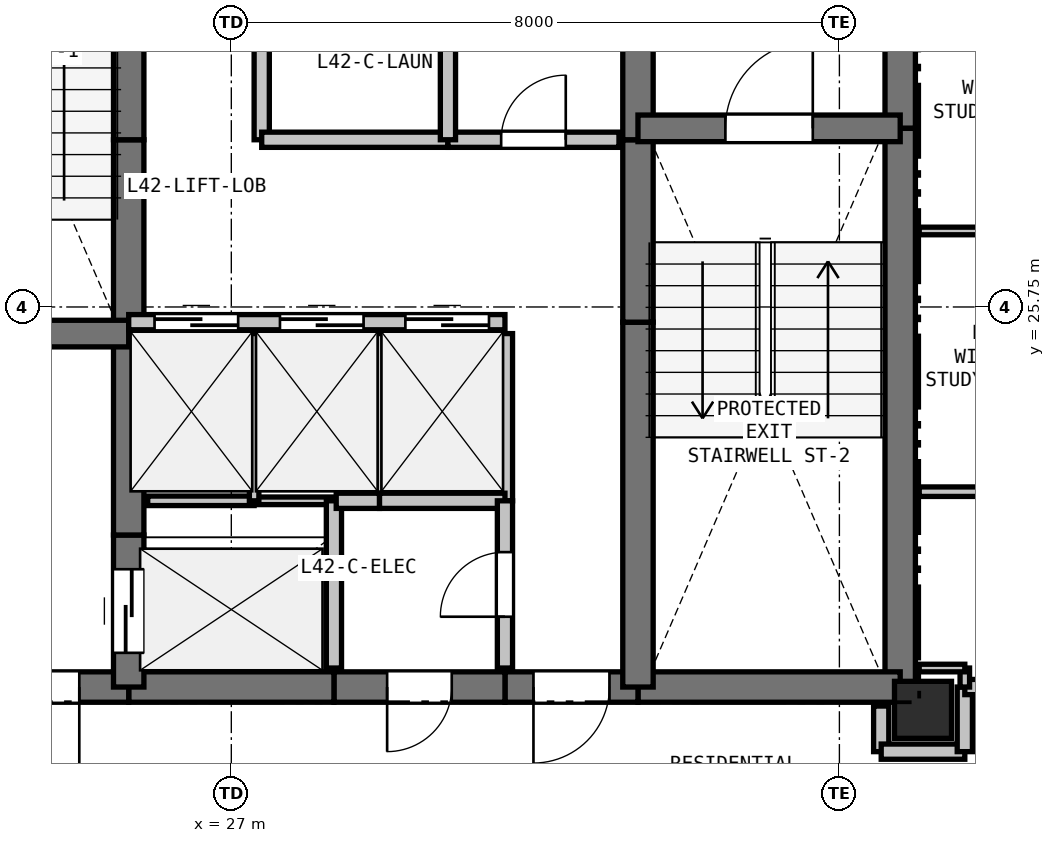
"""IFC4 building model, lengths in metres.
Left out: names, types, materials, properties, quantities, classifications, styles, units other than length and angle.
Written with IfcOpenShell. Run it as: python <this file> out.ifc"""

import sys

from ifc_helpers import new_model, si_unit, direction, frame, frame_2d, origin, origin_2d, place, context, subcontext, project, spatial, rectangle, extrude, element, fill, save


model = new_model("IFC4")
c1 = context("Model", 3, precision=1e-05, world=origin(), true_north=direction((0.0, 1.0)))
c2 = subcontext(c1, "Body", "Model", "MODEL_VIEW")
j1 = project(units=[si_unit("LENGTHUNIT", "METRE"), si_unit("PLANEANGLEUNIT", "RADIAN")], contexts=[c1])
p1 = place(None, origin())
s1 = spatial("IfcSite", under=j1, at=p1, CompositionType="ELEMENT")
p2 = place(p1, origin())
s2 = spatial("IfcBuilding", under=s1, at=p2, CompositionType="ELEMENT")
p3 = place(p2, frame((0.0, 0.0, 150.9)))
s3 = spatial("IfcBuildingStorey", under=s2, at=p3, CompositionType="ELEMENT", Elevation=150.9)
p4 = place(p3, frame((36.1, 20.45, 0.0), z_axis=(0.0, 0.0, 1.0), x_axis=(1.0, 0.0, 0.0)))
e1 = element("IfcColumn", 1, at=p4, inside=s3, PredefinedType="COLUMN", context=c2, shape_type="SweptSolid", body=[
    extrude(rectangle(XDim=0.75, YDim=0.75, at=origin_2d()), origin(), (0.0, 0.0, 1.0), 3.3),
])
p5 = place(p3, frame((35.8, 32.75, 0.0), z_axis=(0.0, 0.0, 1.0), x_axis=(0.0, -1.0, 0.0)))
e2 = element("IfcWall", 2, at=p5, inside=s3, PredefinedType="SHEAR", context=c2, shape_type="SweptSolid", body=[
    extrude(rectangle(XDim=4.65, YDim=0.4, at=frame_2d((2.325, 0.0))), origin(), (0.0, 0.0, 1.0), 3.06),
])
p6 = place(p3, frame((35.8, 28.1, 0.0), z_axis=(0.0, 0.0, 1.0), x_axis=(0.0, -1.0, 0.0)))
e3 = element("IfcWall", 3, at=p6, inside=s3, PredefinedType="SHEAR", context=c2, shape_type="SweptSolid", body=[
    extrude(rectangle(XDim=7.35, YDim=0.4, at=frame_2d((3.675, 0.0))), origin(), (0.0, 0.0, 1.0), 3.06),
])
p7 = place(p3, frame((35.8, 20.75, 0.0), z_axis=(0.0, 0.0, 1.0), x_axis=(-1.0, 0.0, 0.0)))
e4 = element("IfcWall", 4, at=p7, inside=s3, PredefinedType="SHEAR", context=c2, shape_type="SweptSolid", body=[
    extrude(rectangle(XDim=3.45, YDim=0.4, at=frame_2d((1.725, 0.0))), origin(), (0.0, 0.0, 1.0), 3.06),
])
p8 = place(p3, frame((32.35, 20.75, 0.0), z_axis=(0.0, 0.0, 1.0), x_axis=(-1.0, 0.0, 0.0)))
e5 = element("IfcWall", 5, at=p8, inside=s3, PredefinedType="SHEAR", context=c2, shape_type="SweptSolid", body=[
    extrude(rectangle(XDim=1.75, YDim=0.4, at=frame_2d((0.875, 0.0))), origin(), (0.0, 0.0, 1.0), 3.06),
])
p9 = place(p8, frame((0.375, 0.0, 0.0)))
e6 = element("IfcOpeningElement", 6, at=p9, cuts=e5, PredefinedType="OPENING", context=c2, shape_type="SweptSolid", body=[
    extrude(rectangle(XDim=1.0, YDim=2.15, at=frame_2d((0.5, 1.075))), frame((0.0, 0.21, 0.0), z_axis=(0.0, -1.0, 0.0), x_axis=(1.0, 0.0, 0.0)), (0.0, 0.0, 1.0), 0.42),
])
p10 = place(p3, frame((30.6, 20.75, 0.0), z_axis=(0.0, 0.0, 1.0), x_axis=(-1.0, 0.0, 0.0)))
e7 = element("IfcWall", 7, at=p10, inside=s3, PredefinedType="SHEAR", context=c2, shape_type="SweptSolid", body=[
    extrude(rectangle(XDim=2.25, YDim=0.4, at=frame_2d((1.125, 0.0))), origin(), (0.0, 0.0, 1.0), 3.06),
])
p11 = place(p10, frame((0.7, 0.0, 0.0)))
e8 = element("IfcOpeningElement", 8, at=p11, cuts=e7, PredefinedType="OPENING", context=c2, shape_type="SweptSolid", body=[
    extrude(rectangle(XDim=0.85, YDim=2.1, at=frame_2d((0.425, 1.05))), frame((0.0, 0.21, 0.0), z_axis=(0.0, -1.0, 0.0), x_axis=(1.0, 0.0, 0.0)), (0.0, 0.0, 1.0), 0.42),
])
p12 = place(p3, frame((28.35, 20.75, 0.0), z_axis=(0.0, 0.0, 1.0), x_axis=(-1.0, 0.0, 0.0)))
e9 = element("IfcWall", 9, at=p12, inside=s3, PredefinedType="SHEAR", context=c2, shape_type="SweptSolid", body=[
    extrude(rectangle(XDim=2.7, YDim=0.4, at=frame_2d((1.35, 0.0))), origin(), (0.0, 0.0, 1.0), 3.06),
])
p13 = place(p3, frame((25.65, 20.75, 0.0), z_axis=(0.0, 0.0, 1.0), x_axis=(-1.0, 0.0, 0.0)))
e10 = element("IfcWall", 10, at=p13, inside=s3, PredefinedType="SHEAR", context=c2, shape_type="SweptSolid", body=[
    extrude(rectangle(XDim=3.45, YDim=0.4, at=frame_2d((1.725, 0.0))), origin(), (0.0, 0.0, 1.0), 3.06),
])
p14 = place(p13, frame((0.65, 0.0, 0.0)))
e11 = element("IfcOpeningElement", 11, at=p14, cuts=e10, PredefinedType="OPENING", context=c2, shape_type="SweptSolid", body=[
    extrude(rectangle(XDim=1.15, YDim=2.15, at=frame_2d((0.575, 1.075))), frame((0.0, 0.21, 0.0), z_axis=(0.0, -1.0, 0.0), x_axis=(1.0, 0.0, 0.0)), (0.0, 0.0, 1.0), 0.42),
])
p15 = place(p3, frame((25.65, 20.75, 0.0), z_axis=(0.0, 0.0, 1.0), x_axis=(0.0, 1.0, 0.0)))
e12 = element("IfcWall", 12, at=p15, inside=s3, PredefinedType="SHEAR", context=c2, shape_type="SweptSolid", body=[
    extrude(rectangle(XDim=2.0, YDim=0.4, at=frame_2d((1.0, 0.0))), origin(), (0.0, 0.0, 1.0), 3.06),
])
p16 = place(p15, frame((0.45, 0.0, 0.0)))
e13 = element("IfcOpeningElement", 13, at=p16, cuts=e12, PredefinedType="OPENING", context=c2, shape_type="SweptSolid", body=[
    extrude(rectangle(XDim=1.1, YDim=2.15, at=frame_2d((0.55, 1.075))), frame((0.0, 0.21, 0.0), z_axis=(0.0, -1.0, 0.0), x_axis=(1.0, 0.0, 0.0)), (0.0, 0.0, 1.0), 0.42),
])
p17 = place(p3, frame((25.65, 22.75, 0.0), z_axis=(0.0, 0.0, 1.0), x_axis=(0.0, 1.0, 0.0)))
e14 = element("IfcWall", 14, at=p17, inside=s3, PredefinedType="SHEAR", context=c2, shape_type="SweptSolid", body=[
    extrude(rectangle(XDim=2.8, YDim=0.4, at=frame_2d((1.4, 0.0))), origin(), (0.0, 0.0, 1.0), 3.06),
])
p18 = place(p3, frame((25.65, 25.55, 0.0), z_axis=(0.0, 0.0, 1.0), x_axis=(0.0, 1.0, 0.0)))
e15 = element("IfcWall", 15, at=p18, inside=s3, PredefinedType="SHEAR", context=c2, shape_type="SweptSolid", body=[
    extrude(rectangle(XDim=2.4, YDim=0.4, at=frame_2d((1.2, 0.0))), origin(), (0.0, 0.0, 1.0), 3.06),
])
for number, where, z_axis, x_axis in (
    (16, (25.65, 27.95, 0.0), (0.0, 0.0, 1.0), (0.0, 1.0, 0.0)),
    (17, (32.35, 20.75, 0.0), (0.0, 0.0, 1.0), (0.0, 1.0, 0.0)),
):
    element("IfcWall", number, at=place(p3, frame(where, z_axis=z_axis, x_axis=x_axis)), inside=s3, PredefinedType="SHEAR", context=c2, shape_type="SweptSolid", body=[
        extrude(rectangle(XDim=4.8, YDim=0.4, at=frame_2d((2.4, 0.0))), origin(), (0.0, 0.0, 1.0), 3.06),
    ])
p19 = place(p3, frame((32.35, 25.55, 0.0), z_axis=(0.0, 0.0, 1.0), x_axis=(0.0, 1.0, 0.0)))
e18 = element("IfcWall", 18, at=p19, inside=s3, PredefinedType="SHEAR", context=c2, shape_type="SweptSolid", body=[
    extrude(rectangle(XDim=2.4, YDim=0.4, at=frame_2d((1.2, 0.0))), origin(), (0.0, 0.0, 1.0), 3.06),
])
p20 = place(p3, frame((32.35, 27.95, 0.0), z_axis=(0.0, 0.0, 1.0), x_axis=(0.0, 1.0, 0.0)))
e19 = element("IfcWall", 19, at=p20, inside=s3, PredefinedType="SHEAR", context=c2, shape_type="SweptSolid", body=[
    extrude(rectangle(XDim=2.8, YDim=0.4, at=frame_2d((1.4, 0.0))), origin(), (0.0, 0.0, 1.0), 3.06),
])
p21 = place(p3, frame((22.2, 25.4, 0.0), z_axis=(0.0, 0.0, 1.0), x_axis=(1.0, 0.0, 0.0)))
e20 = element("IfcWall", 20, at=p21, inside=s3, PredefinedType="SHEAR", context=c2, shape_type="SweptSolid", body=[
    extrude(rectangle(XDim=3.45, YDim=0.35, at=frame_2d((1.725, 0.0))), origin(), (0.0, 0.0, 1.0), 3.06),
])
p22 = place(p21, frame((1.15, 0.0, 0.0)))
e21 = element("IfcOpeningElement", 21, at=p22, cuts=e20, PredefinedType="OPENING", context=c2, shape_type="SweptSolid", body=[
    extrude(rectangle(XDim=1.15, YDim=2.15, at=frame_2d((0.575, 1.075))), frame((0.0, 0.185, 0.0), z_axis=(0.0, -1.0, 0.0), x_axis=(1.0, 0.0, 0.0)), (0.0, 0.0, 1.0), 0.37),
])
p23 = place(p3, frame((32.35, 28.1, 0.0), z_axis=(0.0, 0.0, 1.0), x_axis=(1.0, 0.0, 0.0)))
e22 = element("IfcWall", 22, at=p23, inside=s3, PredefinedType="SHEAR", context=c2, shape_type="SweptSolid", body=[
    extrude(rectangle(XDim=3.45, YDim=0.35, at=frame_2d((1.725, 0.0))), origin(), (0.0, 0.0, 1.0), 3.06),
])
p24 = place(p23, frame((1.15, 0.0, 0.0)))
e23 = element("IfcOpeningElement", 23, at=p24, cuts=e22, PredefinedType="OPENING", context=c2, shape_type="SweptSolid", body=[
    extrude(rectangle(XDim=1.15, YDim=2.15, at=frame_2d((0.575, 1.075))), frame((0.0, 0.185, 0.0), z_axis=(0.0, -1.0, 0.0), x_axis=(1.0, 0.0, 0.0)), (0.0, 0.0, 1.0), 0.37),
])
p25 = place(p3, frame((25.65, 25.55, 0.0), z_axis=(0.0, 0.0, 1.0), x_axis=(1.0, 0.0, 0.0)))
e24 = element("IfcWall", 24, at=p25, inside=s3, PredefinedType="PARTITIONING", context=c2, shape_type="SweptSolid", body=[
    extrude(rectangle(XDim=4.95, YDim=0.2, at=frame_2d((2.475, 0.0))), origin(), (0.0, 0.0, 1.0), 3.06),
])
p26 = place(p25, frame((0.34, 0.0, 0.0)))
e25 = element("IfcOpeningElement", 25, at=p26, cuts=e24, PredefinedType="OPENING", context=c2, shape_type="SweptSolid", body=[
    extrude(rectangle(XDim=1.1, YDim=2.15, at=frame_2d((0.55, 1.075))), frame((0.0, 0.11, 0.0), z_axis=(0.0, -1.0, 0.0), x_axis=(1.0, 0.0, 0.0)), (0.0, 0.0, 1.0), 0.22),
])
p27 = place(p25, frame((1.99, 0.0, 0.0)))
e26 = element("IfcOpeningElement", 26, at=p27, cuts=e24, PredefinedType="OPENING", context=c2, shape_type="SweptSolid", body=[
    extrude(rectangle(XDim=1.1, YDim=2.15, at=frame_2d((0.55, 1.075))), frame((0.0, 0.11, 0.0), z_axis=(0.0, -1.0, 0.0), x_axis=(1.0, 0.0, 0.0)), (0.0, 0.0, 1.0), 0.22),
])
p28 = place(p25, frame((3.64, 0.0, 0.0)))
e27 = element("IfcOpeningElement", 27, at=p28, cuts=e24, PredefinedType="OPENING", context=c2, shape_type="SweptSolid", body=[
    extrude(rectangle(XDim=1.1, YDim=2.15, at=frame_2d((0.55, 1.075))), frame((0.0, 0.11, 0.0), z_axis=(0.0, -1.0, 0.0), x_axis=(1.0, 0.0, 0.0)), (0.0, 0.0, 1.0), 0.22),
])
p29 = place(p3, frame((25.9, 23.2, 0.0), z_axis=(0.0, 0.0, 1.0), x_axis=(1.0, 0.0, 0.0)))
e28 = element("IfcWall", 28, at=p29, inside=s3, PredefinedType="PARTITIONING", context=c2, shape_type="SweptSolid", body=[
    extrude(rectangle(XDim=1.4, YDim=0.125, at=frame_2d((0.7, 0.0))), origin(), (0.0, 0.0, 1.0), 3.06),
])
p30 = place(p3, frame((27.3, 23.2, 0.0), z_axis=(0.0, 0.0, 1.0), x_axis=(1.0, 0.0, 0.0)))
e29 = element("IfcWall", 29, at=p30, inside=s3, PredefinedType="PARTITIONING", context=c2, shape_type="SweptSolid", body=[
    extrude(rectangle(XDim=1.05, YDim=0.1, at=frame_2d((0.525, 0.0))), origin(), (0.0, 0.0, 1.0), 3.06),
])
p31 = place(p3, frame((28.35, 23.2, 0.0), z_axis=(0.0, 0.0, 1.0), x_axis=(0.0, -1.0, 0.0)))
e30 = element("IfcWall", 30, at=p31, inside=s3, PredefinedType="PARTITIONING", context=c2, shape_type="SweptSolid", body=[
    extrude(rectangle(XDim=2.2, YDim=0.2, at=frame_2d((1.1, 0.0))), origin(), (0.0, 0.0, 1.0), 3.06),
])
p32 = place(p3, frame((27.3, 25.4, 0.0), z_axis=(0.0, 0.0, 1.0), x_axis=(0.0, -1.0, 0.0)))
e31 = element("IfcWall", 31, at=p32, inside=s3, PredefinedType="PARTITIONING", context=c2, shape_type="SweptSolid", body=[
    extrude(rectangle(XDim=2.2, YDim=0.125, at=frame_2d((1.1, 0.0))), origin(), (0.0, 0.0, 1.0), 3.06),
])
p33 = place(p3, frame((28.95, 25.4, 0.0), z_axis=(0.0, 0.0, 1.0), x_axis=(0.0, -1.0, 0.0)))
e32 = element("IfcWall", 32, at=p33, inside=s3, PredefinedType="PARTITIONING", context=c2, shape_type="SweptSolid", body=[
    extrude(rectangle(XDim=2.2, YDim=0.1, at=frame_2d((1.1, 0.0))), origin(), (0.0, 0.0, 1.0), 3.06),
])
p34 = place(p3, frame((28.95, 23.2, 0.0), z_axis=(0.0, 0.0, 1.0), x_axis=(-1.0, 0.0, 0.0)))
e33 = element("IfcWall", 33, at=p34, inside=s3, PredefinedType="PARTITIONING", context=c2, shape_type="SweptSolid", body=[
    extrude(rectangle(XDim=0.57, YDim=0.2, at=frame_2d((0.285, 0.0))), origin(), (0.0, 0.0, 1.0), 3.06),
])
p35 = place(p3, frame((30.6, 25.4, 0.0), z_axis=(0.0, 0.0, 1.0), x_axis=(0.0, -1.0, 0.0)))
e34 = element("IfcWall", 34, at=p35, inside=s3, PredefinedType="PARTITIONING", context=c2, shape_type="SweptSolid", body=[
    extrude(rectangle(XDim=2.2, YDim=0.2, at=frame_2d((1.1, 0.0))), origin(), (0.0, 0.0, 1.0), 3.06),
])
p36 = place(p3, frame((30.6, 23.2, 0.0), z_axis=(0.0, 0.0, 1.0), x_axis=(-1.0, 0.0, 0.0)))
e35 = element("IfcWall", 35, at=p36, inside=s3, PredefinedType="PARTITIONING", context=c2, shape_type="SweptSolid", body=[
    extrude(rectangle(XDim=1.65, YDim=0.2, at=frame_2d((0.825, 0.0))), origin(), (0.0, 0.0, 1.0), 3.06),
])
p37 = place(p3, frame((30.6, 21.0, 0.0), z_axis=(0.0, 0.0, 1.0), x_axis=(0.0, 1.0, 0.0)))
e36 = element("IfcWall", 36, at=p37, inside=s3, PredefinedType="PARTITIONING", context=c2, shape_type="SweptSolid", body=[
    extrude(rectangle(XDim=2.2, YDim=0.2, at=frame_2d((1.1, 0.0))), origin(), (0.0, 0.0, 1.0), 3.06),
])
p38 = place(p37, frame((0.675, 0.0, 0.0)))
e37 = element("IfcOpeningElement", 37, at=p38, cuts=e36, PredefinedType="OPENING", context=c2, shape_type="SweptSolid", body=[
    extrude(rectangle(XDim=0.85, YDim=2.1, at=frame_2d((0.425, 1.05))), frame((0.0, 0.11, 0.0), z_axis=(0.0, -1.0, 0.0), x_axis=(1.0, 0.0, 0.0)), (0.0, 0.0, 1.0), 0.22),
])
p39 = place(p3, frame((27.4, 32.5, 0.0), z_axis=(0.0, 0.0, 1.0), x_axis=(0.0, -1.0, 0.0)))
e38 = element("IfcWall", 38, at=p39, inside=s3, PredefinedType="PARTITIONING", context=c2, shape_type="SweptSolid", body=[
    extrude(rectangle(XDim=4.55, YDim=0.2, at=frame_2d((2.275, 0.0))), origin(), (0.0, 0.0, 1.0), 3.06),
])
p40 = place(p39, frame((1.775, 0.0, 0.0)))
e39 = element("IfcOpeningElement", 39, at=p40, cuts=e38, PredefinedType="OPENING", context=c2, shape_type="SweptSolid", body=[
    extrude(rectangle(XDim=1.0, YDim=2.15, at=frame_2d((0.5, 1.075))), frame((0.0, 0.11, 0.0), z_axis=(0.0, -1.0, 0.0), x_axis=(1.0, 0.0, 0.0)), (0.0, 0.0, 1.0), 0.22),
])
p41 = place(p3, frame((27.4, 27.95, 0.0), z_axis=(0.0, 0.0, 1.0), x_axis=(1.0, 0.0, 0.0)))
e40 = element("IfcWall", 40, at=p41, inside=s3, PredefinedType="PARTITIONING", context=c2, shape_type="SweptSolid", body=[
    extrude(rectangle(XDim=2.45, YDim=0.2, at=frame_2d((1.225, 0.0))), origin(), (0.0, 0.0, 1.0), 3.06),
])
p42 = place(p3, frame((29.85, 27.95, 0.0), z_axis=(0.0, 0.0, 1.0), x_axis=(1.0, 0.0, 0.0)))
e41 = element("IfcWall", 41, at=p42, inside=s3, PredefinedType="PARTITIONING", context=c2, shape_type="SweptSolid", body=[
    extrude(rectangle(XDim=2.25, YDim=0.2, at=frame_2d((1.125, 0.0))), origin(), (0.0, 0.0, 1.0), 3.06),
])
p43 = place(p42, frame((0.7, 0.0, 0.0)))
e42 = element("IfcOpeningElement", 42, at=p43, cuts=e41, PredefinedType="OPENING", context=c2, shape_type="SweptSolid", body=[
    extrude(rectangle(XDim=0.85, YDim=2.1, at=frame_2d((0.425, 1.05))), frame((0.0, 0.11, 0.0), z_axis=(0.0, -1.0, 0.0), x_axis=(1.0, 0.0, 0.0)), (0.0, 0.0, 1.0), 0.22),
])
p44 = place(p3, frame((35.55, 20.5, 0.0), z_axis=(0.0, 0.0, 1.0), x_axis=(0.0, -1.0, 0.0)))
e43 = element("IfcWall", 43, at=p44, inside=s3, PredefinedType="PARTITIONING", context=c2, shape_type="SweptSolid", body=[
    extrude(rectangle(XDim=0.6, YDim=0.2, at=frame_2d((0.3, 0.0))), origin(), (0.0, 0.0, 1.0), 2.585),
])
p45 = place(p3, frame((35.55, 19.9, 0.0), z_axis=(0.0, 0.0, 1.0), x_axis=(1.0, 0.0, 0.0)))
e44 = element("IfcWall", 44, at=p45, inside=s3, PredefinedType="PARTITIONING", context=c2, shape_type="SweptSolid", body=[
    extrude(rectangle(XDim=1.1, YDim=0.2, at=frame_2d((0.55, 0.0))), origin(), (0.0, 0.0, 1.0), 2.433),
])
p46 = place(p3, frame((36.65, 19.9, 0.0), z_axis=(0.0, 0.0, 1.0), x_axis=(0.0, 1.0, 0.0)))
e45 = element("IfcWall", 45, at=p46, inside=s3, PredefinedType="PARTITIONING", context=c2, shape_type="SweptSolid", body=[
    extrude(rectangle(XDim=0.85, YDim=0.2, at=frame_2d((0.425, 0.0))), origin(), (0.0, 0.0, 1.0), 3.06),
])
p47 = place(p3, frame((36.65, 20.75, 0.0), z_axis=(0.0, 0.0, 1.0), x_axis=(1.0, 0.0, 0.0)))
e46 = element("IfcWall", 46, at=p47, inside=s3, PredefinedType="PARTITIONING", context=c2, shape_type="SweptSolid", body=[
    extrude(rectangle(XDim=2.55, YDim=0.2, at=frame_2d((1.275, 0.0))), origin(), (0.0, 0.0, 1.0), 3.06),
])
p48 = place(p47, frame((0.775, 0.0, 0.0)))
e47 = element("IfcOpeningElement", 47, at=p48, cuts=e46, PredefinedType="OPENING", context=c2, shape_type="SweptSolid", body=[
    extrude(rectangle(XDim=1.0, YDim=2.15, at=frame_2d((0.5, 1.075))), frame((0.0, 0.11, 0.0), z_axis=(0.0, -1.0, 0.0), x_axis=(1.0, 0.0, 0.0)), (0.0, 0.0, 1.0), 0.22),
])
p49 = place(p3, frame((29.85, 30.3, 0.0), z_axis=(0.0, 0.0, 1.0), x_axis=(0.0, -1.0, 0.0)))
e48 = element("IfcWall", 48, at=p49, inside=s3, PredefinedType="PARTITIONING", context=c2, shape_type="SweptSolid", body=[
    extrude(rectangle(XDim=2.35, YDim=0.2, at=frame_2d((1.175, 0.0))), origin(), (0.0, 0.0, 1.0), 3.06),
])
p50 = place(p3, frame((36.65, 20.75, 0.0), z_axis=(0.0, 0.0, 1.0), x_axis=(0.0, 1.0, 0.0)))
e49 = element("IfcWall", 49, at=p50, inside=s3, PredefinedType="PARTITIONING", context=c2, shape_type="SweptSolid", body=[
    extrude(rectangle(XDim=0.25, YDim=0.125, at=frame_2d((0.125, 0.0))), origin(), (0.0, 0.0, 1.0), 3.06),
])
p51 = place(p3, frame((36.65, 21.0, 0.0), z_axis=(0.0, 0.0, 1.0), x_axis=(-1.0, 0.0, 0.0)))
e50 = element("IfcWall", 50, at=p51, inside=s3, PredefinedType="PARTITIONING", context=c2, shape_type="SweptSolid", body=[
    extrude(rectangle(XDim=0.6, YDim=0.1, at=frame_2d((0.3, 0.0))), origin(), (0.0, 0.0, 1.0), 2.585),
])
p52 = place(p3, frame((36.05, 23.32, 0.0), z_axis=(0.0, 0.0, 1.0), x_axis=(1.0, 0.0, 0.0)))
e51 = element("IfcWall", 51, at=p52, inside=s3, PredefinedType="PARTITIONING", context=c2, shape_type="SweptSolid", body=[
    extrude(rectangle(XDim=6.131, YDim=0.125, at=frame_2d((3.065, 0.0))), origin(), (0.0, 0.0, 1.0), 2.365),
])
p53 = place(p52, frame((2.615, 0.0, 0.0)))
e52 = element("IfcOpeningElement", 52, at=p53, cuts=e51, PredefinedType="OPENING", context=c2, shape_type="SweptSolid", body=[
    extrude(rectangle(XDim=0.9, YDim=2.1, at=frame_2d((0.45, 1.05))), frame((0.0, 0.073, 0.0), z_axis=(0.0, -1.0, 0.0), x_axis=(1.0, 0.0, 0.0)), (0.0, 0.0, 1.0), 0.145),
])
p54 = place(p3, frame((36.05, 26.75, 0.0), z_axis=(0.0, 0.0, 1.0), x_axis=(1.0, 0.0, 0.0)))
e53 = element("IfcWall", 53, at=p54, inside=s3, PredefinedType="PARTITIONING", context=c2, shape_type="SweptSolid", body=[
    extrude(rectangle(XDim=6.131, YDim=0.1, at=frame_2d((3.065, 0.0))), origin(), (0.0, 0.0, 1.0), 2.365),
])
p55 = place(p54, frame((2.615, 0.0, 0.0)))
e54 = element("IfcOpeningElement", 54, at=p55, cuts=e53, PredefinedType="OPENING", context=c2, shape_type="SweptSolid", body=[
    extrude(rectangle(XDim=0.9, YDim=2.1, at=frame_2d((0.45, 1.05))), frame((0.0, 0.06, 0.0), z_axis=(0.0, -1.0, 0.0), x_axis=(1.0, 0.0, 0.0)), (0.0, 0.0, 1.0), 0.12),
])
p56 = place(p26, origin())
e55 = element("IfcDoor", 55, at=p56, inside=s3, OperationType="SLIDING_TO_LEFT", PredefinedType="DOOR", context=c2, shape_type="SweptSolid", body=[
    extrude(rectangle(XDim=1.1, YDim=2.15, at=frame_2d((0.55, 1.075))), frame((0.0, 0.025, 0.0), z_axis=(0.0, -1.0, 0.0), x_axis=(1.0, 0.0, 0.0)), (0.0, 0.0, 1.0), 0.05),
])
fill(e25, e55)
p57 = place(p27, origin())
e56 = element("IfcDoor", 56, at=p57, inside=s3, OperationType="SLIDING_TO_LEFT", PredefinedType="DOOR", context=c2, shape_type="SweptSolid", body=[
    extrude(rectangle(XDim=1.1, YDim=2.15, at=frame_2d((0.55, 1.075))), frame((0.0, 0.025, 0.0), z_axis=(0.0, -1.0, 0.0), x_axis=(1.0, 0.0, 0.0)), (0.0, 0.0, 1.0), 0.05),
])
fill(e26, e56)
p58 = place(p28, origin())
e57 = element("IfcDoor", 57, at=p58, inside=s3, OperationType="SLIDING_TO_LEFT", PredefinedType="DOOR", context=c2, shape_type="SweptSolid", body=[
    extrude(rectangle(XDim=1.1, YDim=2.15, at=frame_2d((0.55, 1.075))), frame((0.0, 0.025, 0.0), z_axis=(0.0, -1.0, 0.0), x_axis=(1.0, 0.0, 0.0)), (0.0, 0.0, 1.0), 0.05),
])
fill(e27, e57)
p59 = place(p9, origin())
e58 = element("IfcDoor", 58, at=p59, inside=s3, OperationType="SINGLE_SWING_RIGHT", PredefinedType="DOOR", context=c2, shape_type="SweptSolid", body=[
    extrude(rectangle(XDim=1.0, YDim=2.15, at=frame_2d((0.5, 1.075))), frame((0.0, 0.025, 0.0), z_axis=(0.0, -1.0, 0.0), x_axis=(1.0, 0.0, 0.0)), (0.0, 0.0, 1.0), 0.05),
])
fill(e6, e58)
p60 = place(p16, origin())
e59 = element("IfcDoor", 59, at=p60, inside=s3, OperationType="SLIDING_TO_LEFT", PredefinedType="DOOR", context=c2, shape_type="SweptSolid", body=[
    extrude(rectangle(XDim=1.1, YDim=2.15, at=frame_2d((0.55, 1.075))), frame((0.0, 0.025, 0.0), z_axis=(0.0, -1.0, 0.0), x_axis=(1.0, 0.0, 0.0)), (0.0, 0.0, 1.0), 0.05),
])
fill(e13, e59)
p61 = place(p24, origin())
e60 = element("IfcDoor", 60, at=p61, inside=s3, OperationType="SINGLE_SWING_RIGHT", PredefinedType="DOOR", context=c2, shape_type="SweptSolid", body=[
    extrude(rectangle(XDim=1.15, YDim=2.15, at=frame_2d((0.575, 1.075))), frame((0.0, 0.025, 0.0), z_axis=(0.0, -1.0, 0.0), x_axis=(1.0, 0.0, 0.0)), (0.0, 0.0, 1.0), 0.05),
])
fill(e23, e60)
p62 = place(p14, origin())
e61 = element("IfcDoor", 61, at=p62, inside=s3, OperationType="SINGLE_SWING_LEFT", PredefinedType="DOOR", context=c2, shape_type="SweptSolid", body=[
    extrude(rectangle(XDim=1.15, YDim=2.15, at=frame_2d((0.575, 1.075))), frame((0.0, 0.025, 0.0), z_axis=(0.0, -1.0, 0.0), x_axis=(1.0, 0.0, 0.0)), (0.0, 0.0, 1.0), 0.05),
])
fill(e11, e61)
p63 = place(p43, origin())
e62 = element("IfcDoor", 62, at=p63, inside=s3, OperationType="SINGLE_SWING_RIGHT", PredefinedType="DOOR", context=c2, shape_type="SweptSolid", body=[
    extrude(rectangle(XDim=0.85, YDim=2.1, at=frame_2d((0.425, 1.05))), frame((0.0, 0.025, 0.0), z_axis=(0.0, -1.0, 0.0), x_axis=(1.0, 0.0, 0.0)), (0.0, 0.0, 1.0), 0.05),
])
fill(e42, e62)
p64 = place(p38, origin())
e63 = element("IfcDoor", 63, at=p64, inside=s3, OperationType="SINGLE_SWING_LEFT", PredefinedType="DOOR", context=c2, shape_type="SweptSolid", body=[
    extrude(rectangle(XDim=0.85, YDim=2.1, at=frame_2d((0.425, 1.05))), frame((0.0, 0.025, 0.0), z_axis=(0.0, -1.0, 0.0), x_axis=(1.0, 0.0, 0.0)), (0.0, 0.0, 1.0), 0.05),
])
fill(e37, e63)
p65 = place(p11, origin())
e64 = element("IfcDoor", 64, at=p65, inside=s3, OperationType="SINGLE_SWING_RIGHT", PredefinedType="DOOR", context=c2, shape_type="SweptSolid", body=[
    extrude(rectangle(XDim=0.85, YDim=2.1, at=frame_2d((0.425, 1.05))), frame((0.0, 0.025, 0.0), z_axis=(0.0, -1.0, 0.0), x_axis=(1.0, 0.0, 0.0)), (0.0, 0.0, 1.0), 0.05),
])
fill(e8, e64)
save(model, sys.argv[1])
